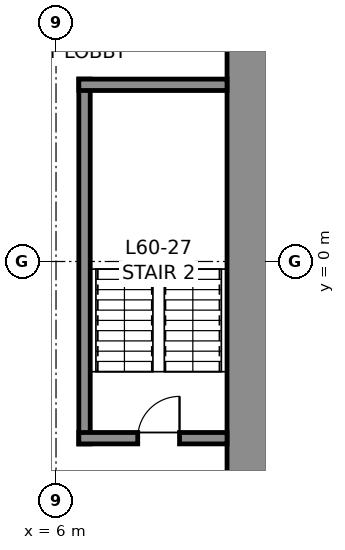
"""IFC4 building model, lengths in metres.
Left out: names, types, materials, properties, quantities, classifications, styles, units other than length and angle.
Written with IfcOpenShell. Run it as: python <this file> out.ifc"""

import sys

from ifc_helpers import new_model, si_unit, direction, frame, frame_2d, origin, place, context, subcontext, project, spatial, rectangle, extrude, element, fill, save


model = new_model("IFC4")
c1 = context("Model", 3, precision=1e-05, world=origin(), true_north=direction((0.0, 1.0)))
c2 = subcontext(c1, "Body", "Model", "MODEL_VIEW")
j1 = project(units=[si_unit("LENGTHUNIT", "METRE"), si_unit("PLANEANGLEUNIT", "RADIAN")], contexts=[c1])
p1 = place(None, origin())
s1 = spatial("IfcSite", under=j1, at=p1, CompositionType="ELEMENT")
p2 = place(p1, origin())
s2 = spatial("IfcBuilding", under=s1, at=p2, CompositionType="ELEMENT")
p3 = place(p2, frame((0.0, 0.0, 269.8)))
s3 = spatial("IfcBuildingStorey", under=s2, at=p3, CompositionType="ELEMENT", Elevation=269.8)
p4 = place(p3, frame((11.25, 10.5, 0.0), z_axis=(0.0, 0.0, 1.0), x_axis=(0.0, -1.0, 0.0)))
e1 = element("IfcWall", 1, at=p4, inside=s3, PredefinedType="SHEAR", context=c2, shape_type="SweptSolid", body=[
    extrude(rectangle(XDim=21.0, YDim=1.5, at=frame_2d((10.5, 0.0))), origin(), (0.0, 0.0, 1.0), 4.0),
])
p5 = place(p4, frame((3.7, 0.0, 0.0)))
e2 = element("IfcOpeningElement", 2, at=p5, cuts=e1, PredefinedType="OPENING", context=c2, shape_type="SweptSolid", body=[
    extrude(rectangle(XDim=1.2, YDim=2.3, at=frame_2d((0.6, 1.15))), frame((0.0, 0.76, 0.0), z_axis=(0.0, -1.0, 0.0), x_axis=(1.0, 0.0, 0.0)), (0.0, 0.0, 1.0), 1.52),
])
p6 = place(p4, frame((16.1, 0.0, 0.0)))
e3 = element("IfcOpeningElement", 3, at=p6, cuts=e1, PredefinedType="OPENING", context=c2, shape_type="SweptSolid", body=[
    extrude(rectangle(XDim=1.2, YDim=2.3, at=frame_2d((0.6, 1.15))), frame((0.0, 0.76, 0.0), z_axis=(0.0, -1.0, 0.0), x_axis=(1.0, 0.0, 0.0)), (0.0, 0.0, 1.0), 1.52),
])
p7 = place(p3, frame((6.75, -4.8, 0.0), z_axis=(0.0, 0.0, 1.0), x_axis=(0.0, 1.0, 0.0)))
e4 = element("IfcWall", 4, at=p7, inside=s3, PredefinedType="SOLIDWALL", context=c2, shape_type="SweptSolid", body=[
    extrude(rectangle(XDim=9.6, YDim=0.3, at=frame_2d((4.8, 0.0))), origin(), (0.0, 0.0, 1.0), 3.75),
])
p8 = place(p3, frame((6.6, 4.65, 0.0), z_axis=(0.0, 0.0, 1.0), x_axis=(1.0, 0.0, 0.0)))
e5 = element("IfcWall", 5, at=p8, inside=s3, PredefinedType="SOLIDWALL", context=c2, shape_type="SweptSolid", body=[
    extrude(rectangle(XDim=3.9, YDim=0.3, at=frame_2d((1.95, 0.0))), origin(), (0.0, 0.0, 1.0), 3.75),
])
p9 = place(p3, frame((10.5, -4.65, 0.0), z_axis=(0.0, 0.0, 1.0), x_axis=(-1.0, 0.0, 0.0)))
e6 = element("IfcWall", 6, at=p9, inside=s3, PredefinedType="SOLIDWALL", context=c2, shape_type="SweptSolid", body=[
    extrude(rectangle(XDim=3.9, YDim=0.3, at=frame_2d((1.95, 0.0))), origin(), (0.0, 0.0, 1.0), 3.75),
])
p10 = place(p9, frame((1.25, 0.0, 0.0)))
e7 = element("IfcOpeningElement", 7, at=p10, cuts=e6, PredefinedType="OPENING", context=c2, shape_type="SweptSolid", body=[
    extrude(rectangle(XDim=1.1, YDim=2.3, at=frame_2d((0.55, 1.15))), frame((0.0, 0.16, 0.0), z_axis=(0.0, -1.0, 0.0), x_axis=(1.0, 0.0, 0.0)), (0.0, 0.0, 1.0), 0.32),
])
p11 = place(p10, frame((1.1, 0.0, 0.0), z_axis=(0.0, 0.0, 1.0), x_axis=(-1.0, 0.0, 0.0)))
e8 = element("IfcDoor", 8, at=p11, inside=s3, OperationType="SINGLE_SWING_RIGHT", PredefinedType="DOOR", context=c2, shape_type="SweptSolid", body=[
    extrude(rectangle(XDim=1.1, YDim=2.3, at=frame_2d((0.55, 1.15))), frame((0.0, 0.025, 0.0), z_axis=(0.0, -1.0, 0.0), x_axis=(1.0, 0.0, 0.0)), (0.0, 0.0, 1.0), 0.05),
])
fill(e7, e8)
save(model, sys.argv[1])
